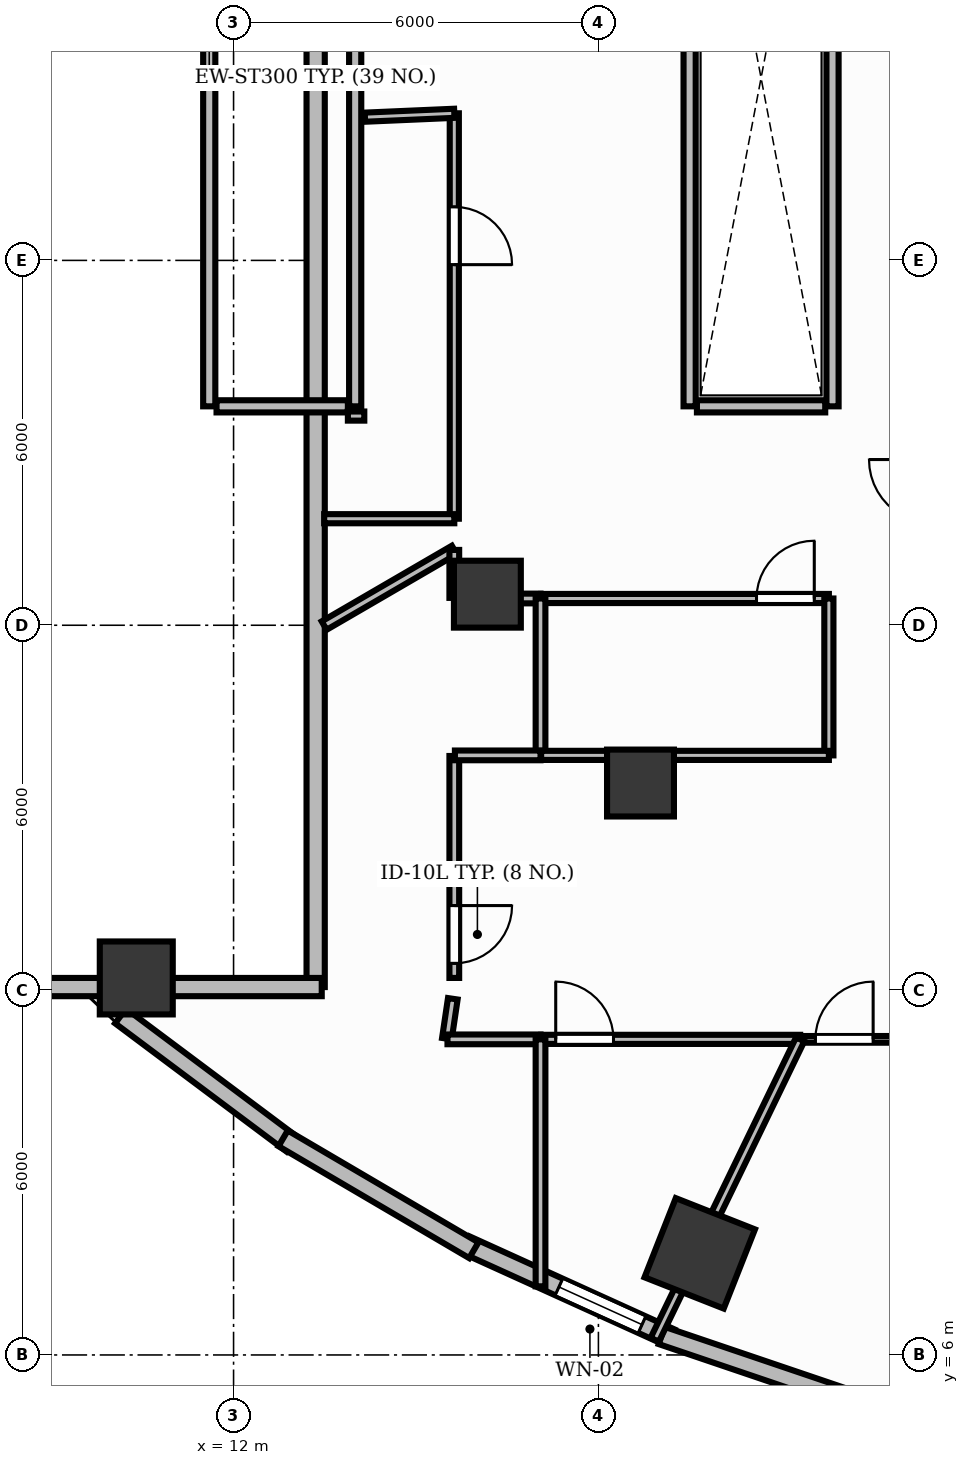
"""IFC4 building model, lengths in metres.
Left out: names, types, materials, properties, quantities, classifications, styles, units other than length and angle.
Written with IfcOpenShell. Run it as: python <this file> out.ifc"""

import sys

from ifc_helpers import new_model, si_unit, direction, frame, frame_2d, origin, origin_2d, place, context, subcontext, project, spatial, rectangle, extrude, element, fill, save


model = new_model("IFC4")
c1 = context("Model", 3, precision=1e-05, world=origin(), true_north=direction((0.0, 1.0)))
c2 = subcontext(c1, "Body", "Model", "MODEL_VIEW")
j1 = project(units=[si_unit("LENGTHUNIT", "METRE"), si_unit("PLANEANGLEUNIT", "RADIAN")], contexts=[c1])
p1 = place(None, origin())
s1 = spatial("IfcSite", under=j1, at=p1, CompositionType="ELEMENT")
p2 = place(p1, origin())
s2 = spatial("IfcBuilding", under=s1, at=p2, CompositionType="ELEMENT")
p3 = place(p2, frame((0.0, 0.0, 5.4)))
s3 = spatial("IfcBuildingStorey", under=s2, at=p3, CompositionType="ELEMENT", Elevation=5.4)
p4 = place(p3, frame((10.4, 12.2, -0.32), z_axis=(0.0, 0.0, 1.0), x_axis=(1.0, 0.0, 0.0)))
e1 = element("IfcColumn", 1, at=p4, inside=s3, PredefinedType="COLUMN", context=c2, shape_type="SweptSolid", body=[
    extrude(rectangle(XDim=1.2, YDim=1.2, at=origin_2d()), origin(), (0.0, 0.0, 1.0), 4.82),
])
for number, where, z_axis, x_axis in (
    (2, (16.174, 18.511, -0.0), (0.0, 0.0, 1.0), (1.0, 0.0, 0.0)),
    (3, (18.692, 15.405, -0.0), (0.0, 0.0, 1.0), (1.0, 0.0, 0.0)),
):
    element("IfcColumn", number, at=place(p3, frame(where, z_axis=z_axis, x_axis=x_axis)), inside=s3, PredefinedType="COLUMN", context=c2, shape_type="SweptSolid", body=[
        extrude(rectangle(XDim=1.1, YDim=1.1, at=origin_2d()), origin(), (0.0, 0.0, 1.0), 4.501),
    ])
p5 = place(p3, frame((19.667, 7.671, -0.0), z_axis=(0.0, 0.0, 1.0), x_axis=(-0.930225540858, 0.366988341962, 0.0)))
e4 = element("IfcColumn", 4, at=p5, inside=s3, PredefinedType="COLUMN", context=c2, shape_type="SweptSolid", body=[
    extrude(rectangle(XDim=1.4, YDim=1.4, at=origin_2d()), origin(), (0.0, 0.0, 1.0), 4.501),
])
p6 = place(p3, frame((15.822, 7.812, 0.0), z_axis=(0.0, 0.0, 1.0), x_axis=(0.910608120407, -0.413270917254, 0.0)))
e5 = element("IfcWall", 5, at=p6, inside=s3, PredefinedType="STANDARD", context=c2, shape_type="SweptSolid", body=[
    extrude(rectangle(XDim=3.7, YDim=0.3, at=frame_2d((1.85, 0.0))), origin(), (0.0, 0.0, 1.0), 4.5),
])
p7 = place(p6, frame((1.679, 0.0, 0.95)))
e6 = element("IfcOpeningElement", 6, at=p7, cuts=e5, PredefinedType="OPENING", context=c2, shape_type="SweptSolid", body=[
    extrude(rectangle(XDim=1.5, YDim=1.8, at=frame_2d((0.75, 0.9))), frame((0.0, 0.165, 0.0), z_axis=(0.0, -1.0, 0.0), x_axis=(1.0, 0.0, 0.0)), (0.0, 0.0, 1.0), 0.33),
])
p8 = place(p3, frame((10.142, 11.573, 0.0), z_axis=(0.0, 0.0, 1.0), x_axis=(0.800823020995, -0.598901067827, 0.0)))
e7 = element("IfcWall", 7, at=p8, inside=s3, PredefinedType="STANDARD", context=c2, shape_type="SweptSolid", body=[
    extrude(rectangle(XDim=3.521, YDim=0.3, at=frame_2d((1.76, 0.0))), origin(), (0.0, 0.0, 1.0), 4.5),
])
p9 = place(p3, frame((12.815, 9.562, 0.0), z_axis=(0.0, 0.0, 1.0), x_axis=(0.8624654944, -0.506115867139, 0.0)))
e8 = element("IfcWall", 8, at=p9, inside=s3, PredefinedType="STANDARD", context=c2, shape_type="SweptSolid", body=[
    extrude(rectangle(XDim=3.635, YDim=0.3, at=frame_2d((1.818, 0.0))), origin(), (0.0, 0.0, 1.0), 4.5),
])
p10 = place(p3, frame((19.04, 6.321, 0.0), z_axis=(0.0, 0.0, 1.0), x_axis=(0.94702579403, -0.321157508773, 0.0)))
e9 = element("IfcWall", 9, at=p10, inside=s3, PredefinedType="STANDARD", context=c2, shape_type="SweptSolid", body=[
    extrude(rectangle(XDim=3.83, YDim=0.3, at=frame_2d((1.915, 0.0))), origin(), (0.0, 0.0, 1.0), 4.5),
])
p11 = place(p3, frame((13.35, 12.05, 0.0), z_axis=(0.0, 0.0, 1.0), x_axis=(0.0, 1.0, 0.0)))
e10 = element("IfcWall", 10, at=p11, inside=s3, PredefinedType="STANDARD", context=c2, shape_type="SweptSolid", body=[
    extrude(rectangle(XDim=29.9, YDim=0.3, at=frame_2d((14.95, 0.0))), origin(), (0.0, 0.0, 1.0), 4.5),
])
p12 = place(p3, frame((8.6, 12.05, 0.0), z_axis=(0.0, 0.0, 1.0), x_axis=(1.0, 0.0, 0.0)))
e11 = element("IfcWall", 11, at=p12, inside=s3, PredefinedType="STANDARD", context=c2, shape_type="SweptSolid", body=[
    extrude(rectangle(XDim=4.85, YDim=0.3, at=frame_2d((2.425, 0.0))), origin(), (0.0, 0.0, 1.0), 4.5),
])
for number, where, z_axis, x_axis in (
    (12, (11.6, 21.6, 0.0), (0.0, 0.0, 1.0), (0.0, 1.0, 0.0)),
    (13, (14.0, 21.6, 0.0), (0.0, 0.0, 1.0), (0.0, 1.0, 0.0)),
):
    element("IfcWall", number, at=place(p3, frame(where, z_axis=z_axis, x_axis=x_axis)), inside=s3, PredefinedType="PARTITIONING", context=c2, shape_type="SweptSolid", body=[
        extrude(rectangle(XDim=10.8, YDim=0.2, at=frame_2d((5.4, 0.0))), origin(), (0.0, 0.0, 1.0), 3.51),
    ])
p13 = place(p3, frame((11.72, 21.6, 0.0), z_axis=(0.0, 0.0, 1.0), x_axis=(1.0, 0.0, 0.0)))
e14 = element("IfcWall", 14, at=p13, inside=s3, PredefinedType="PARTITIONING", context=c2, shape_type="SweptSolid", body=[
    extrude(rectangle(XDim=2.16, YDim=0.2, at=frame_2d((1.08, 0.0))), origin(), (0.0, 0.0, 1.0), 3.51),
])
for number, where, z_axis, x_axis in (
    (15, (19.5, 21.6, 0.0), (0.0, 0.0, 1.0), (0.0, 1.0, 0.0)),
    (16, (21.85, 21.6, 0.0), (0.0, 0.0, 1.0), (0.0, 1.0, 0.0)),
):
    element("IfcWall", number, at=place(p3, frame(where, z_axis=z_axis, x_axis=x_axis)), inside=s3, PredefinedType="PARTITIONING", context=c2, shape_type="SweptSolid", body=[
        extrude(rectangle(XDim=10.8, YDim=0.2, at=frame_2d((5.4, 0.0))), origin(), (0.0, 0.0, 1.0), 3.51),
    ])
p14 = place(p3, frame((19.62, 21.6, 0.0), z_axis=(0.0, 0.0, 1.0), x_axis=(1.0, 0.0, 0.0)))
e17 = element("IfcWall", 17, at=p14, inside=s3, PredefinedType="PARTITIONING", context=c2, shape_type="SweptSolid", body=[
    extrude(rectangle(XDim=2.11, YDim=0.2, at=frame_2d((1.055, 0.0))), origin(), (0.0, 0.0, 1.0), 3.51),
])
p15 = place(p3, frame((15.63, 26.419, 0.0), z_axis=(0.0, 0.0, 1.0), x_axis=(0.0, -1.0, 0.0)))
e18 = element("IfcWall", 18, at=p15, inside=s3, PredefinedType="PARTITIONING", context=c2, shape_type="SweptSolid", body=[
    extrude(rectangle(XDim=6.667, YDim=0.15, at=frame_2d((3.333, 0.0))), origin(), (0.0, 0.0, 1.0), 3.51),
])
p16 = place(p15, frame((1.539, 0.0, 0.0)))
e19 = element("IfcOpeningElement", 19, at=p16, cuts=e18, PredefinedType="OPENING", context=c2, shape_type="SweptSolid", body=[
    extrude(rectangle(XDim=0.95, YDim=2.15, at=frame_2d((0.475, 1.075))), frame((0.0, 0.09, 0.0), z_axis=(0.0, -1.0, 0.0), x_axis=(1.0, 0.0, 0.0)), (0.0, 0.0, 1.0), 0.18),
])
p17 = place(p3, frame((15.63, 15.85, 0.0), z_axis=(0.0, 0.0, 1.0), x_axis=(0.0, -1.0, 0.0)))
e20 = element("IfcWall", 20, at=p17, inside=s3, PredefinedType="PARTITIONING", context=c2, shape_type="SweptSolid", body=[
    extrude(rectangle(XDim=3.65, YDim=0.16, at=frame_2d((1.825, 0.0))), origin(), (0.0, 0.0, 1.0), 3.51),
])
p18 = place(p17, frame((2.46, 0.0, 0.0)))
e21 = element("IfcOpeningElement", 21, at=p18, cuts=e20, PredefinedType="OPENING", context=c2, shape_type="SweptSolid", body=[
    extrude(rectangle(XDim=0.95, YDim=2.15, at=frame_2d((0.475, 1.075))), frame((0.0, 0.095, 0.0), z_axis=(0.0, -1.0, 0.0), x_axis=(1.0, 0.0, 0.0)), (0.0, 0.0, 1.0), 0.19),
])
p19 = place(p3, frame((17.058, 18.44, 0.0), z_axis=(0.0, 0.0, 1.0), x_axis=(1.0, 0.0, 0.0)))
e22 = element("IfcWall", 22, at=p19, inside=s3, PredefinedType="PARTITIONING", context=c2, shape_type="SweptSolid", body=[
    extrude(rectangle(XDim=4.732, YDim=0.15, at=frame_2d((2.366, 0.0))), origin(), (0.0, 0.0, 1.0), 3.51),
])
p20 = place(p19, frame((3.542, 0.0, 0.0)))
e23 = element("IfcOpeningElement", 23, at=p20, cuts=e22, PredefinedType="OPENING", context=c2, shape_type="SweptSolid", body=[
    extrude(rectangle(XDim=0.95, YDim=2.15, at=frame_2d((0.475, 1.075))), frame((0.0, 0.09, 0.0), z_axis=(0.0, -1.0, 0.0), x_axis=(1.0, 0.0, 0.0)), (0.0, 0.0, 1.0), 0.18),
])
p21 = place(p3, frame((17.058, 11.19, 0.0), z_axis=(0.0, 0.0, 1.0), x_axis=(1.0, 0.0, 0.0)))
e24 = element("IfcWall", 24, at=p21, inside=s3, PredefinedType="PARTITIONING", context=c2, shape_type="SweptSolid", body=[
    extrude(rectangle(XDim=4.26, YDim=0.15, at=frame_2d((2.13, 0.0))), origin(), (0.0, 0.0, 1.0), 3.51),
])
p22 = place(p21, frame((0.24, 0.0, 0.0)))
e25 = element("IfcOpeningElement", 25, at=p22, cuts=e24, PredefinedType="OPENING", context=c2, shape_type="SweptSolid", body=[
    extrude(rectangle(XDim=0.95, YDim=2.15, at=frame_2d((0.475, 1.075))), frame((0.0, 0.09, 0.0), z_axis=(0.0, -1.0, 0.0), x_axis=(1.0, 0.0, 0.0)), (0.0, 0.0, 1.0), 0.18),
])
p23 = place(p3, frame((21.328, 11.19, 0.0), z_axis=(0.0, 0.0, 1.0), x_axis=(1.0, 0.0, 0.0)))
e26 = element("IfcWall", 26, at=p23, inside=s3, PredefinedType="MOVABLE", context=c2, shape_type="SweptSolid", body=[
    extrude(rectangle(XDim=11.721, YDim=0.11, at=frame_2d((5.861, 0.0))), origin(), (0.0, 0.0, 1.0), 3.51),
])
p24 = place(p23, frame((0.24, 0.0, 0.0)))
e27 = element("IfcOpeningElement", 27, at=p24, cuts=e26, PredefinedType="OPENING", context=c2, shape_type="SweptSolid", body=[
    extrude(rectangle(XDim=0.95, YDim=2.15, at=frame_2d((0.475, 1.075))), frame((0.0, 0.07, 0.0), z_axis=(0.0, -1.0, 0.0), x_axis=(1.0, 0.0, 0.0)), (0.0, 0.0, 1.0), 0.14),
])
p25 = place(p3, frame((14.16, 26.355, 0.0), z_axis=(0.0, 0.0, 1.0), x_axis=(0.99906178529, 0.043307611022, 0.0)))
e28 = element("IfcWall", 28, at=p25, inside=s3, PredefinedType="PARTITIONING", context=c2, shape_type="SweptSolid", body=[
    extrude(rectangle(XDim=1.471, YDim=0.15, at=frame_2d((0.736, 0.0))), origin(), (0.0, 0.0, 1.0), 3.51),
])
p26 = place(p3, frame((15.63, 19.752, 0.0), z_axis=(0.0, 0.0, 1.0), x_axis=(-1.0, 0.0, 0.0)))
e29 = element("IfcWall", 29, at=p26, inside=s3, PredefinedType="PARTITIONING", context=c2, shape_type="SweptSolid", body=[
    extrude(rectangle(XDim=2.14, YDim=0.15, at=frame_2d((1.07, 0.0))), origin(), (0.0, 0.0, 1.0), 3.51),
])
p27 = place(p3, frame((13.88, 21.44, 0.0), z_axis=(0.0, 0.0, 1.0), x_axis=(1.0, 0.0, 0.0)))
e30 = element("IfcWall", 30, at=p27, inside=s3, PredefinedType="PARTITIONING", context=c2, shape_type="SweptSolid", body=[
    extrude(rectangle(XDim=0.27, YDim=0.15, at=frame_2d((0.135, 0.0))), origin(), (0.0, 0.0, 1.0), 3.51),
])
p28 = place(p3, frame((13.49, 17.994, 0.0), z_axis=(0.0, 0.0, 1.0), x_axis=(0.864461338107, 0.502699308651, 0.0)))
e31 = element("IfcWall", 31, at=p28, inside=s3, PredefinedType="PARTITIONING", context=c2, shape_type="SweptSolid", body=[
    extrude(rectangle(XDim=2.475, YDim=0.16, at=frame_2d((1.238, 0.0))), origin(), (0.0, 0.0, 1.0), 3.51),
])
p29 = place(p3, frame((15.63, 19.239, 0.0), z_axis=(0.0, 0.0, 1.0), x_axis=(0.0, -1.0, 0.0)))
e32 = element("IfcWall", 32, at=p29, inside=s3, PredefinedType="PARTITIONING", context=c2, shape_type="SweptSolid", body=[
    extrude(rectangle(XDim=0.789, YDim=0.16, at=frame_2d((0.395, 0.0))), origin(), (0.0, 0.0, 1.0), 3.51),
])
p30 = place(p3, frame((15.64, 18.44, 0.0), z_axis=(0.0, 0.0, 1.0), x_axis=(1.0, 0.0, 0.0)))
e33 = element("IfcWall", 33, at=p30, inside=s3, PredefinedType="PARTITIONING", context=c2, shape_type="SweptSolid", body=[
    extrude(rectangle(XDim=1.408, YDim=0.16, at=frame_2d((0.704, 0.0))), origin(), (0.0, 0.0, 1.0), 3.51),
])
p31 = place(p3, frame((17.048, 18.44, 0.0), z_axis=(0.0, 0.0, 1.0), x_axis=(0.0, -1.0, 0.0)))
e34 = element("IfcWall", 34, at=p31, inside=s3, PredefinedType="PARTITIONING", context=c2, shape_type="SweptSolid", body=[
    extrude(rectangle(XDim=2.58, YDim=0.16, at=frame_2d((1.29, 0.0))), origin(), (0.0, 0.0, 1.0), 3.51),
])
p32 = place(p3, frame((17.048, 15.86, 0.0), z_axis=(0.0, 0.0, 1.0), x_axis=(-1.0, 0.0, 0.0)))
e35 = element("IfcWall", 35, at=p32, inside=s3, PredefinedType="PARTITIONING", context=c2, shape_type="SweptSolid", body=[
    extrude(rectangle(XDim=1.408, YDim=0.16, at=frame_2d((0.704, 0.0))), origin(), (0.0, 0.0, 1.0), 3.51),
])
p33 = place(p3, frame((15.605, 11.857, 0.0), z_axis=(0.0, 0.0, 1.0), x_axis=(-0.146882189547, -0.989153993266, 0.0)))
e36 = element("IfcWall", 36, at=p33, inside=s3, PredefinedType="PARTITIONING", context=c2, shape_type="SweptSolid", body=[
    extrude(rectangle(XDim=0.663, YDim=0.16, at=frame_2d((0.332, 0.0))), origin(), (0.0, 0.0, 1.0), 3.51),
])
p34 = place(p3, frame((15.518, 11.19, 0.0), z_axis=(0.0, 0.0, 1.0), x_axis=(1.0, 0.0, 0.0)))
e37 = element("IfcWall", 37, at=p34, inside=s3, PredefinedType="PARTITIONING", context=c2, shape_type="SweptSolid", body=[
    extrude(rectangle(XDim=1.53, YDim=0.16, at=frame_2d((0.765, 0.0))), origin(), (0.0, 0.0, 1.0), 3.51),
])
p35 = place(p3, frame((17.048, 11.19, 0.0), z_axis=(0.0, 0.0, 1.0), x_axis=(0.0, -1.0, 0.0)))
e38 = element("IfcWall", 38, at=p35, inside=s3, PredefinedType="PARTITIONING", context=c2, shape_type="SweptSolid", body=[
    extrude(rectangle(XDim=4.061, YDim=0.16, at=frame_2d((2.031, 0.0))), origin(), (0.0, 0.0, 1.0), 3.51),
])
p36 = place(p3, frame((21.79, 18.44, 0.0), z_axis=(0.0, 0.0, 1.0), x_axis=(0.0, -1.0, 0.0)))
e39 = element("IfcWall", 39, at=p36, inside=s3, PredefinedType="PARTITIONING", context=c2, shape_type="SweptSolid", body=[
    extrude(rectangle(XDim=2.58, YDim=0.15, at=frame_2d((1.29, 0.0))), origin(), (0.0, 0.0, 1.0), 3.51),
])
p37 = place(p3, frame((21.79, 15.86, 0.0), z_axis=(0.0, 0.0, 1.0), x_axis=(-1.0, 0.0, 0.0)))
e40 = element("IfcWall", 40, at=p37, inside=s3, PredefinedType="PARTITIONING", context=c2, shape_type="SweptSolid", body=[
    extrude(rectangle(XDim=4.732, YDim=0.15, at=frame_2d((2.366, 0.0))), origin(), (0.0, 0.0, 1.0), 3.51),
])
p38 = place(p3, frame((21.318, 11.19, 0.0), z_axis=(0.0, 0.0, 1.0), x_axis=(-0.435717889699, -0.900083285367, 0.0)))
e41 = element("IfcWall", 41, at=p38, inside=s3, PredefinedType="PARTITIONING", context=c2, shape_type="SweptSolid", body=[
    extrude(rectangle(XDim=5.488, YDim=0.15, at=frame_2d((2.744, 0.0))), origin(), (0.0, 0.0, 1.0), 3.51),
])
p39 = place(p7, origin())
e42 = element("IfcWindow", 42, at=p39, inside=s3, PartitioningType="DOUBLE_PANEL_VERTICAL", PredefinedType="WINDOW", context=c2, shape_type="SweptSolid", body=[
    extrude(rectangle(XDim=1.5, YDim=1.8, at=frame_2d((0.75, 0.9))), frame((0.0, 0.03, 0.0), z_axis=(0.0, -1.0, 0.0), x_axis=(1.0, 0.0, 0.0)), (0.0, 0.0, 1.0), 0.06),
])
fill(e6, e42)
p40 = place(p16, origin())
e43 = element("IfcDoor", 43, at=p40, inside=s3, OperationType="SINGLE_SWING_RIGHT", PredefinedType="DOOR", context=c2, shape_type="SweptSolid", body=[
    extrude(rectangle(XDim=0.95, YDim=2.15, at=frame_2d((0.475, 1.075))), frame((0.0, 0.025, 0.0), z_axis=(0.0, -1.0, 0.0), x_axis=(1.0, 0.0, 0.0)), (0.0, 0.0, 1.0), 0.05),
])
fill(e19, e43)
p41 = place(p18, origin())
e44 = element("IfcDoor", 44, at=p41, inside=s3, OperationType="SINGLE_SWING_LEFT", PredefinedType="DOOR", context=c2, shape_type="SweptSolid", body=[
    extrude(rectangle(XDim=0.95, YDim=2.15, at=frame_2d((0.475, 1.075))), frame((0.0, 0.025, 0.0), z_axis=(0.0, -1.0, 0.0), x_axis=(1.0, 0.0, 0.0)), (0.0, 0.0, 1.0), 0.05),
])
fill(e21, e44)
p42 = place(p20, origin())
e45 = element("IfcDoor", 45, at=p42, inside=s3, OperationType="SINGLE_SWING_RIGHT", PredefinedType="DOOR", context=c2, shape_type="SweptSolid", body=[
    extrude(rectangle(XDim=0.95, YDim=2.15, at=frame_2d((0.475, 1.075))), frame((0.0, 0.025, 0.0), z_axis=(0.0, -1.0, 0.0), x_axis=(1.0, 0.0, 0.0)), (0.0, 0.0, 1.0), 0.05),
])
fill(e23, e45)
p43 = place(p22, origin())
e46 = element("IfcDoor", 46, at=p43, inside=s3, OperationType="SINGLE_SWING_LEFT", PredefinedType="DOOR", context=c2, shape_type="SweptSolid", body=[
    extrude(rectangle(XDim=0.95, YDim=2.15, at=frame_2d((0.475, 1.075))), frame((0.0, 0.025, 0.0), z_axis=(0.0, -1.0, 0.0), x_axis=(1.0, 0.0, 0.0)), (0.0, 0.0, 1.0), 0.05),
])
fill(e25, e46)
p44 = place(p24, origin())
e47 = element("IfcDoor", 47, at=p44, inside=s3, OperationType="SINGLE_SWING_RIGHT", PredefinedType="DOOR", context=c2, shape_type="SweptSolid", body=[
    extrude(rectangle(XDim=0.95, YDim=2.15, at=frame_2d((0.475, 1.075))), frame((0.0, 0.025, 0.0), z_axis=(0.0, -1.0, 0.0), x_axis=(1.0, 0.0, 0.0)), (0.0, 0.0, 1.0), 0.05),
])
fill(e27, e47)
save(model, sys.argv[1])
